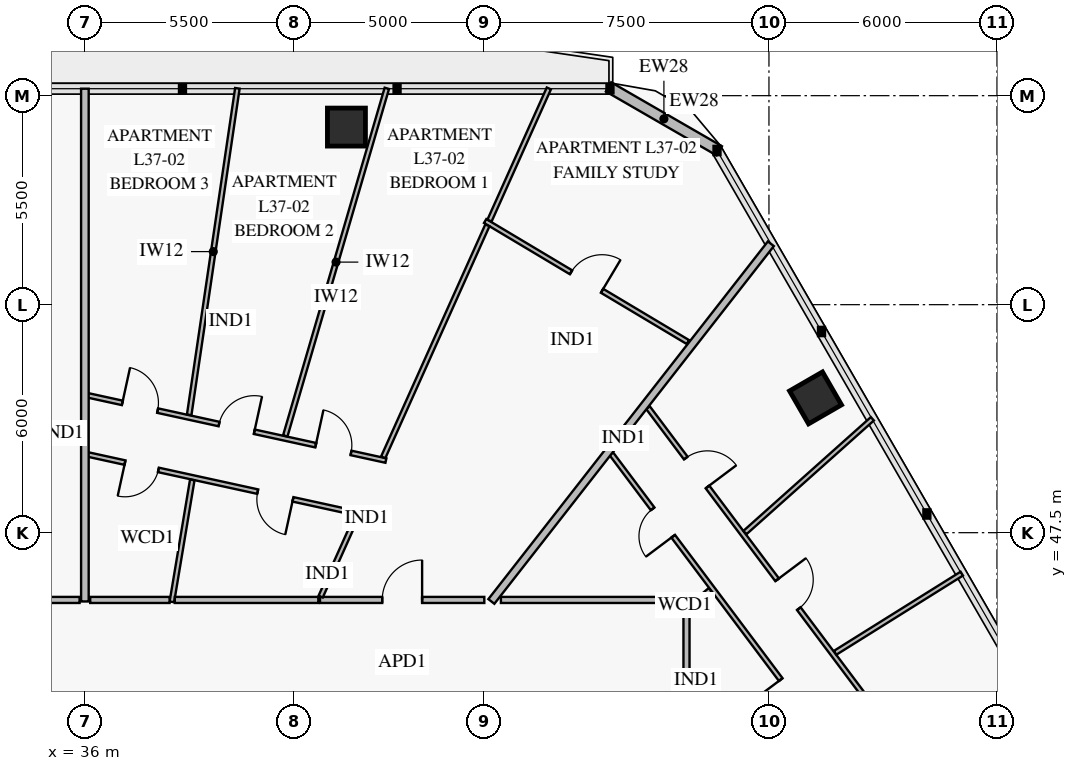
"""IFC4 building model, lengths in metres.
Left out: names, types, materials, properties, quantities, classifications, styles, units other than length and angle.
Written with IfcOpenShell. Run it as: python <this file> out.ifc"""

import sys

from ifc_helpers import new_model, si_unit, direction, frame, frame_2d, origin, origin_2d, place, context, subcontext, project, spatial, rectangle, extrude, element, fill, save


model = new_model("IFC4")
c1 = context("Model", 3, precision=1e-05, world=origin(), true_north=direction((0.0, 1.0)))
c2 = subcontext(c1, "Body", "Model", "MODEL_VIEW")
j1 = project(units=[si_unit("LENGTHUNIT", "METRE"), si_unit("PLANEANGLEUNIT", "RADIAN")], contexts=[c1])
p1 = place(None, origin())
s1 = spatial("IfcSite", under=j1, at=p1, CompositionType="ELEMENT")
p2 = place(p1, origin())
s2 = spatial("IfcBuilding", under=s1, at=p2, CompositionType="ELEMENT")
p3 = place(p2, frame((0.0, 0.0, 150.4)))
s3 = spatial("IfcBuildingStorey", under=s2, at=p3, CompositionType="ELEMENT", Elevation=150.4)
for number, where, z_axis, x_axis in (
    (1, (55.226, 51.047, 0.0), (0.0, 0.0, 1.0), (-0.5, 0.866, 0.0)),
    (2, (42.882, 58.173, 0.0), (0.0, 0.0, 1.0), (-1.0, 0.0, 0.0)),
):
    element("IfcColumn", number, at=place(p3, frame(where, z_axis=z_axis, x_axis=x_axis)), inside=s3, PredefinedType="COLUMN", context=c2, shape_type="SweptSolid", body=[
        extrude(rectangle(XDim=1.0, YDim=1.0, at=origin_2d()), origin(), (0.0, 0.0, 1.0), 3.55),
    ])
p4 = place(p3, frame((49.779, 59.231, 0.0), z_axis=(0.0, 0.0, 1.0), x_axis=(0.866020068361, -0.500009241111, 0.0)))
e3 = element("IfcWall", 3, at=p4, inside=s3, PredefinedType="SOLIDWALL", context=c2, shape_type="SweptSolid", body=[
    extrude(rectangle(XDim=3.365, YDim=0.28, at=frame_2d((1.683, 0.0))), origin(), (0.0, 0.0, 1.0), 3.55),
])
p5 = place(p3, frame((56.748, 40.385, 0.0), z_axis=(0.0, 0.0, 1.0), x_axis=(-0.600156370002, 0.799882698616, 0.0)))
e4 = element("IfcWall", 4, at=p5, inside=s3, PredefinedType="PARTITIONING", context=c2, shape_type="SweptSolid", body=[
    extrude(rectangle(XDim=11.49, YDim=0.12, at=frame_2d((5.745, 0.0))), origin(), (0.0, 0.0, 1.0), 2.9),
])
p6 = place(p5, frame((3.112, 0.0, 0.0)))
e5 = element("IfcOpeningElement", 5, at=p6, cuts=e4, PredefinedType="OPENING", context=c2, shape_type="SweptSolid", body=[
    extrude(rectangle(XDim=0.95, YDim=2.1, at=frame_2d((0.475, 1.05))), frame((0.0, 0.072, 0.0), z_axis=(0.0, -1.0, 0.0), x_axis=(1.0, 0.0, 0.0)), (0.0, 0.0, 1.0), 0.144),
])
p7 = place(p5, frame((8.779, 0.0, 0.0)))
e6 = element("IfcOpeningElement", 6, at=p7, cuts=e4, PredefinedType="OPENING", context=c2, shape_type="SweptSolid", body=[
    extrude(rectangle(XDim=0.9, YDim=2.1, at=frame_2d((0.45, 1.05))), frame((0.0, 0.072, 0.0), z_axis=(0.0, -1.0, 0.0), x_axis=(1.0, 0.0, 0.0)), (0.0, 0.0, 1.0), 0.144),
])
p8 = place(p3, frame((58.183, 40.972, 0.0), z_axis=(0.0, 0.0, 1.0), x_axis=(-0.600136851624, 0.79989734299, 0.0)))
e7 = element("IfcWall", 7, at=p8, inside=s3, PredefinedType="PARTITIONING", context=c2, shape_type="SweptSolid", body=[
    extrude(rectangle(XDim=12.273, YDim=0.12, at=frame_2d((6.136, 0.0))), origin(), (0.0, 0.0, 1.0), 2.9),
])
p9 = place(p8, frame((1.657, 0.0, 0.0)))
e8 = element("IfcOpeningElement", 8, at=p9, cuts=e7, PredefinedType="OPENING", context=c2, shape_type="SweptSolid", body=[
    extrude(rectangle(XDim=0.95, YDim=2.1, at=frame_2d((0.475, 1.05))), frame((0.0, 0.072, 0.0), z_axis=(0.0, -1.0, 0.0), x_axis=(1.0, 0.0, 0.0)), (0.0, 0.0, 1.0), 0.144),
])
p10 = place(p8, frame((5.662, 0.0, 0.0)))
e9 = element("IfcOpeningElement", 9, at=p10, cuts=e7, PredefinedType="OPENING", context=c2, shape_type="SweptSolid", body=[
    extrude(rectangle(XDim=0.95, YDim=2.1, at=frame_2d((0.475, 1.05))), frame((0.0, 0.072, 0.0), z_axis=(0.0, -1.0, 0.0), x_axis=(1.0, 0.0, 0.0)), (0.0, 0.0, 1.0), 0.144),
])
p11 = place(p8, frame((9.666, 0.0, 0.0)))
e10 = element("IfcOpeningElement", 10, at=p11, cuts=e7, PredefinedType="OPENING", context=c2, shape_type="SweptSolid", body=[
    extrude(rectangle(XDim=0.95, YDim=2.1, at=frame_2d((0.475, 1.05))), frame((0.0, 0.072, 0.0), z_axis=(0.0, -1.0, 0.0), x_axis=(1.0, 0.0, 0.0)), (0.0, 0.0, 1.0), 0.144),
])
p12 = place(p3, frame((51.868, 52.516, 0.0), z_axis=(0.0, 0.0, 1.0), x_axis=(-0.85861051464, 0.512628505012, 0.0)))
e11 = element("IfcWall", 11, at=p12, inside=s3, PredefinedType="PARTITIONING", context=c2, shape_type="SweptSolid", body=[
    extrude(rectangle(XDim=6.215, YDim=0.12, at=frame_2d((3.107, 0.0))), origin(), (0.0, 0.0, 1.0), 3.55),
])
p13 = place(p12, frame((2.632, 0.0, 0.0)))
e12 = element("IfcOpeningElement", 12, at=p13, cuts=e11, PredefinedType="OPENING", context=c2, shape_type="SweptSolid", body=[
    extrude(rectangle(XDim=0.95, YDim=2.1, at=frame_2d((0.475, 1.05))), frame((0.0, 0.072, 0.0), z_axis=(0.0, -1.0, 0.0), x_axis=(1.0, 0.0, 0.0)), (0.0, 0.0, 1.0), 0.144),
])
p14 = place(p3, frame((43.285, 47.981, 0.0), z_axis=(0.0, 0.0, 1.0), x_axis=(-0.976898726502, 0.213702779952, 0.0)))
e13 = element("IfcWall", 13, at=p14, inside=s3, PredefinedType="PARTITIONING", context=c2, shape_type="SweptSolid", body=[
    extrude(rectangle(XDim=7.403, YDim=0.12, at=frame_2d((3.701, 0.0))), origin(), (0.0, 0.0, 1.0), 2.9),
])
p15 = place(p14, frame((1.853, 0.0, 0.0)))
e14 = element("IfcOpeningElement", 14, at=p15, cuts=e13, PredefinedType="OPENING", context=c2, shape_type="SweptSolid", body=[
    extrude(rectangle(XDim=0.95, YDim=2.1, at=frame_2d((0.475, 1.05))), frame((0.0, 0.072, 0.0), z_axis=(0.0, -1.0, 0.0), x_axis=(1.0, 0.0, 0.0)), (0.0, 0.0, 1.0), 0.144),
])
p16 = place(p14, frame((5.477, 0.0, 0.0)))
e15 = element("IfcOpeningElement", 15, at=p16, cuts=e13, PredefinedType="OPENING", context=c2, shape_type="SweptSolid", body=[
    extrude(rectangle(XDim=0.9, YDim=2.1, at=frame_2d((0.45, 1.05))), frame((0.0, 0.072, 0.0), z_axis=(0.0, -1.0, 0.0), x_axis=(1.0, 0.0, 0.0)), (0.0, 0.0, 1.0), 0.144),
])
p17 = place(p3, frame((43.921, 49.398, 0.0), z_axis=(0.0, 0.0, 1.0), x_axis=(-0.976896253364, 0.213714085082, 0.0)))
e16 = element("IfcWall", 16, at=p17, inside=s3, PredefinedType="PARTITIONING", context=c2, shape_type="SweptSolid", body=[
    extrude(rectangle(XDim=8.04, YDim=0.12, at=frame_2d((4.02, 0.0))), origin(), (0.0, 0.0, 1.0), 2.9),
])
p18 = place(p17, frame((0.94, 0.0, 0.0)))
e17 = element("IfcOpeningElement", 17, at=p18, cuts=e16, PredefinedType="OPENING", context=c2, shape_type="SweptSolid", body=[
    extrude(rectangle(XDim=0.95, YDim=2.1, at=frame_2d((0.475, 1.05))), frame((0.0, 0.072, 0.0), z_axis=(0.0, -1.0, 0.0), x_axis=(1.0, 0.0, 0.0)), (0.0, 0.0, 1.0), 0.144),
])
p19 = place(p17, frame((3.545, 0.0, 0.0)))
e18 = element("IfcOpeningElement", 18, at=p19, cuts=e16, PredefinedType="OPENING", context=c2, shape_type="SweptSolid", body=[
    extrude(rectangle(XDim=0.95, YDim=2.1, at=frame_2d((0.475, 1.05))), frame((0.0, 0.072, 0.0), z_axis=(0.0, -1.0, 0.0), x_axis=(1.0, 0.0, 0.0)), (0.0, 0.0, 1.0), 0.144),
])
p20 = place(p17, frame((6.15, 0.0, 0.0)))
e19 = element("IfcOpeningElement", 19, at=p20, cuts=e16, PredefinedType="OPENING", context=c2, shape_type="SweptSolid", body=[
    extrude(rectangle(XDim=0.95, YDim=2.1, at=frame_2d((0.475, 1.05))), frame((0.0, 0.072, 0.0), z_axis=(0.0, -1.0, 0.0), x_axis=(1.0, 0.0, 0.0)), (0.0, 0.0, 1.0), 0.144),
])
p21 = place(p3, frame((46.51, 45.73, 0.0), z_axis=(0.0, 0.0, 1.0), x_axis=(-1.0, 0.0, 0.0)))
e20 = element("IfcWall", 20, at=p21, inside=s3, PredefinedType="PARTITIONING", context=c2, shape_type="SweptSolid", body=[
    extrude(rectangle(XDim=4.323, YDim=0.16, at=frame_2d((2.162, 0.0))), origin(), (0.0, 0.0, 1.0), 3.55),
])
p22 = place(p21, frame((1.637, 0.0, 0.0)))
e21 = element("IfcOpeningElement", 21, at=p22, cuts=e20, PredefinedType="OPENING", context=c2, shape_type="SweptSolid", body=[
    extrude(rectangle(XDim=1.05, YDim=2.15, at=frame_2d((0.525, 1.075))), frame((0.0, 0.092, 0.0), z_axis=(0.0, -1.0, 0.0), x_axis=(1.0, 0.0, 0.0)), (0.0, 0.0, 1.0), 0.184),
])
p23 = place(p3, frame((35.86, 45.73, 0.0), z_axis=(0.0, 0.0, 1.0), x_axis=(-1.0, 0.0, 0.0)))
e22 = element("IfcWall", 22, at=p23, inside=s3, PredefinedType="PARTITIONING", context=c2, shape_type="SweptSolid", body=[
    extrude(rectangle(XDim=3.797, YDim=0.16, at=frame_2d((1.898, 0.0))), origin(), (0.0, 0.0, 1.0), 2.9),
])
p24 = place(p23, frame((1.374, 0.0, 0.0)))
e23 = element("IfcOpeningElement", 23, at=p24, cuts=e22, PredefinedType="OPENING", context=c2, shape_type="SweptSolid", body=[
    extrude(rectangle(XDim=1.05, YDim=2.15, at=frame_2d((0.525, 1.075))), frame((0.0, 0.092, 0.0), z_axis=(0.0, -1.0, 0.0), x_axis=(1.0, 0.0, 0.0)), (0.0, 0.0, 1.0), 0.184),
])
p25 = place(p3, frame((51.78, 45.425, 0.0), z_axis=(0.0, 0.0, 1.0), x_axis=(0.761652645913, 0.647985529911, 0.0)))
e24 = element("IfcWall", 24, at=p25, inside=s3, PredefinedType="PARTITIONING", context=c2, shape_type="SweptSolid", body=[
    extrude(rectangle(XDim=0.883, YDim=0.12, at=frame_2d((0.441, 0.0))), origin(), (0.0, 0.0, 1.0), 3.55),
])
p26 = place(p3, frame((55.741, 44.339, 0.0), z_axis=(0.0, 0.0, 1.0), x_axis=(0.847998304005, 0.529998940003, 0.0)))
e25 = element("IfcWall", 25, at=p26, inside=s3, PredefinedType="PARTITIONING", context=c2, shape_type="SweptSolid", body=[
    extrude(rectangle(XDim=3.929, YDim=0.12, at=frame_2d((1.965, 0.0))), origin(), (0.0, 0.0, 1.0), 2.87),
])
p27 = place(p3, frame((53.368, 47.503, 0.0), z_axis=(0.0, 0.0, 1.0), x_axis=(0.746002225815, 0.665943450361, 0.0)))
e26 = element("IfcWall", 26, at=p27, inside=s3, PredefinedType="PARTITIONING", context=c2, shape_type="SweptSolid", body=[
    extrude(rectangle(XDim=4.495, YDim=0.12, at=frame_2d((2.248, 0.0))), origin(), (0.0, 0.0, 1.0), 2.87),
])
p28 = place(p3, frame((46.696, 45.69, 0.0), z_axis=(0.0, 0.0, 1.0), x_axis=(0.615655544117, 0.788015387539, 0.0)))
e27 = element("IfcWall", 27, at=p28, inside=s3, PredefinedType="PARTITIONING", context=c2, shape_type="SweptSolid", body=[
    extrude(rectangle(XDim=11.945, YDim=0.2, at=frame_2d((5.973, 0.0))), origin(), (0.0, 0.0, 1.0), 2.87),
])
p29 = place(p3, frame((38.289, 45.68, 0.0), z_axis=(0.0, 0.0, 1.0), x_axis=(0.165019864142, 0.986290243508, 0.0)))
e28 = element("IfcWall", 28, at=p29, inside=s3, PredefinedType="PARTITIONING", context=c2, shape_type="SweptSolid", body=[
    extrude(rectangle(XDim=3.252, YDim=0.12, at=frame_2d((1.626, 0.0))), origin(), (0.0, 0.0, 1.0), 3.55),
])
p30 = place(p3, frame((41.273, 50.047, 0.0), z_axis=(0.0, 0.0, 1.0), x_axis=(0.280455502413, 0.959867027856, 0.0)))
e29 = element("IfcWall", 29, at=p30, inside=s3, PredefinedType="PARTITIONING", context=c2, shape_type="SweptSolid", body=[
    extrude(rectangle(XDim=9.529, YDim=0.12, at=frame_2d((4.764, 0.0))), origin(), (0.0, 0.0, 1.0), 2.87),
])
p31 = place(p3, frame((38.744, 50.6, 0.0), z_axis=(0.0, 0.0, 1.0), x_axis=(0.145960873314, 0.989290363574, 0.0)))
e30 = element("IfcWall", 30, at=p31, inside=s3, PredefinedType="PARTITIONING", context=c2, shape_type="SweptSolid", body=[
    extrude(rectangle(XDim=8.686, YDim=0.12, at=frame_2d((4.343, 0.0))), origin(), (0.0, 0.0, 1.0), 2.87),
])
p32 = place(p3, frame((42.204, 45.818, 0.0), z_axis=(0.0, 0.0, 1.0), x_axis=(0.409661727666, 0.91223750684, 0.0)))
e31 = element("IfcWall", 31, at=p32, inside=s3, PredefinedType="PARTITIONING", context=c2, shape_type="SweptSolid", body=[
    extrude(rectangle(XDim=2.325, YDim=0.12, at=frame_2d((1.163, 0.0))), origin(), (0.0, 0.0, 1.0), 3.55),
])
p33 = place(p3, frame((43.85, 49.483, 0.0), z_axis=(0.0, 0.0, 1.0), x_axis=(0.409625724798, 0.912253673922, 0.0)))
e32 = element("IfcWall", 32, at=p33, inside=s3, PredefinedType="PARTITIONING", context=c2, shape_type="SweptSolid", body=[
    extrude(rectangle(XDim=6.691, YDim=0.12, at=frame_2d((3.346, 0.0))), origin(), (0.0, 0.0, 1.0), 3.55),
])
p34 = place(p3, frame((46.647, 55.712, 0.0), z_axis=(0.0, 0.0, 1.0), x_axis=(0.409634994126, 0.912249511695, 0.0)))
e33 = element("IfcWall", 33, at=p34, inside=s3, PredefinedType="PARTITIONING", context=c2, shape_type="SweptSolid", body=[
    extrude(rectangle(XDim=3.812, YDim=0.12, at=frame_2d((1.906, 0.0))), origin(), (0.0, 0.0, 1.0), 2.87),
])
p35 = place(p3, frame((36.0, 45.69, 0.0), z_axis=(0.0, 0.0, 1.0), x_axis=(0.0, 1.0, 0.0)))
e34 = element("IfcWall", 34, at=p35, inside=s3, PredefinedType="PARTITIONING", context=c2, shape_type="SweptSolid", body=[
    extrude(rectangle(XDim=13.493, YDim=0.2, at=frame_2d((6.747, 0.0))), origin(), (0.0, 0.0, 1.0), 2.87),
])
p36 = place(p3, frame((51.83, 41.85, 0.0), z_axis=(0.0, 0.0, 1.0), x_axis=(0.0, 1.0, 0.0)))
e35 = element("IfcWall", 35, at=p36, inside=s3, PredefinedType="PARTITIONING", context=c2, shape_type="SweptSolid", body=[
    extrude(rectangle(XDim=3.528, YDim=0.16, at=frame_2d((1.764, 0.0))), origin(), (0.0, 0.0, 1.0), 3.15),
])
p37 = place(p3, frame((51.65, 45.73, 0.0), z_axis=(0.0, 0.0, 1.0), x_axis=(-1.0, 0.0, 0.0)))
e36 = element("IfcWall", 36, at=p37, inside=s3, PredefinedType="PARTITIONING", context=c2, shape_type="SweptSolid", body=[
    extrude(rectangle(XDim=4.703, YDim=0.16, at=frame_2d((2.352, 0.0))), origin(), (0.0, 0.0, 1.0), 2.9),
])
p38 = place(p3, frame((42.143, 45.73, 0.0), z_axis=(0.0, 0.0, 1.0), x_axis=(-1.0, 0.0, 0.0)))
e37 = element("IfcWall", 37, at=p38, inside=s3, PredefinedType="PARTITIONING", context=c2, shape_type="SweptSolid", body=[
    extrude(rectangle(XDim=3.777, YDim=0.16, at=frame_2d((1.888, 0.0))), origin(), (0.0, 0.0, 1.0), 2.9),
])
p39 = place(p3, frame((38.228, 45.73, 0.0), z_axis=(0.0, 0.0, 1.0), x_axis=(-1.0, 0.0, 0.0)))
e38 = element("IfcWall", 38, at=p39, inside=s3, PredefinedType="PARTITIONING", context=c2, shape_type="SweptSolid", body=[
    extrude(rectangle(XDim=2.088, YDim=0.16, at=frame_2d((1.044, 0.0))), origin(), (0.0, 0.0, 1.0), 3.55),
])
p40 = place(p6, origin())
e39 = element("IfcDoor", 39, at=p40, inside=s3, OperationType="SINGLE_SWING_RIGHT", PredefinedType="DOOR", context=c2, shape_type="SweptSolid", body=[
    extrude(rectangle(XDim=0.95, YDim=2.1, at=frame_2d((0.475, 1.05))), frame((0.0, 0.025, 0.0), z_axis=(0.0, -1.0, 0.0), x_axis=(1.0, 0.0, 0.0)), (0.0, 0.0, 1.0), 0.05),
])
fill(e5, e39)
p41 = place(p7, origin())
e40 = element("IfcDoor", 40, at=p41, inside=s3, OperationType="SINGLE_SWING_LEFT", PredefinedType="DOOR", context=c2, shape_type="SweptSolid", body=[
    extrude(rectangle(XDim=0.9, YDim=2.1, at=frame_2d((0.45, 1.05))), frame((0.0, 0.025, 0.0), z_axis=(0.0, -1.0, 0.0), x_axis=(1.0, 0.0, 0.0)), (0.0, 0.0, 1.0), 0.05),
])
fill(e6, e40)
p42 = place(p10, frame((0.95, 0.0, 0.0), z_axis=(0.0, 0.0, 1.0), x_axis=(-1.0, 0.0, 0.0)))
e41 = element("IfcDoor", 41, at=p42, inside=s3, OperationType="SINGLE_SWING_LEFT", PredefinedType="DOOR", context=c2, shape_type="SweptSolid", body=[
    extrude(rectangle(XDim=0.95, YDim=2.1, at=frame_2d((0.475, 1.05))), frame((0.0, 0.025, 0.0), z_axis=(0.0, -1.0, 0.0), x_axis=(1.0, 0.0, 0.0)), (0.0, 0.0, 1.0), 0.05),
])
fill(e9, e41)
p43 = place(p11, frame((0.95, 0.0, 0.0), z_axis=(0.0, 0.0, 1.0), x_axis=(-1.0, 0.0, 0.0)))
e42 = element("IfcDoor", 42, at=p43, inside=s3, OperationType="SINGLE_SWING_RIGHT", PredefinedType="DOOR", context=c2, shape_type="SweptSolid", body=[
    extrude(rectangle(XDim=0.95, YDim=2.1, at=frame_2d((0.475, 1.05))), frame((0.0, 0.025, 0.0), z_axis=(0.0, -1.0, 0.0), x_axis=(1.0, 0.0, 0.0)), (0.0, 0.0, 1.0), 0.05),
])
fill(e10, e42)
p44 = place(p13, frame((0.95, 0.0, 0.0), z_axis=(0.0, 0.0, 1.0), x_axis=(-1.0, 0.0, 0.0)))
e43 = element("IfcDoor", 43, at=p44, inside=s3, OperationType="SINGLE_SWING_RIGHT", PredefinedType="DOOR", context=c2, shape_type="SweptSolid", body=[
    extrude(rectangle(XDim=0.95, YDim=2.1, at=frame_2d((0.475, 1.05))), frame((0.0, 0.025, 0.0), z_axis=(0.0, -1.0, 0.0), x_axis=(1.0, 0.0, 0.0)), (0.0, 0.0, 1.0), 0.05),
])
fill(e12, e43)
p45 = place(p15, origin())
e44 = element("IfcDoor", 44, at=p45, inside=s3, OperationType="SINGLE_SWING_LEFT", PredefinedType="DOOR", context=c2, shape_type="SweptSolid", body=[
    extrude(rectangle(XDim=0.95, YDim=2.1, at=frame_2d((0.475, 1.05))), frame((0.0, 0.025, 0.0), z_axis=(0.0, -1.0, 0.0), x_axis=(1.0, 0.0, 0.0)), (0.0, 0.0, 1.0), 0.05),
])
fill(e14, e44)
p46 = place(p16, origin())
e45 = element("IfcDoor", 45, at=p46, inside=s3, OperationType="SINGLE_SWING_RIGHT", PredefinedType="DOOR", context=c2, shape_type="SweptSolid", body=[
    extrude(rectangle(XDim=0.9, YDim=2.1, at=frame_2d((0.45, 1.05))), frame((0.0, 0.025, 0.0), z_axis=(0.0, -1.0, 0.0), x_axis=(1.0, 0.0, 0.0)), (0.0, 0.0, 1.0), 0.05),
])
fill(e15, e45)
p47 = place(p18, frame((0.95, 0.0, 0.0), z_axis=(0.0, 0.0, 1.0), x_axis=(-1.0, 0.0, 0.0)))
e46 = element("IfcDoor", 46, at=p47, inside=s3, OperationType="SINGLE_SWING_LEFT", PredefinedType="DOOR", context=c2, shape_type="SweptSolid", body=[
    extrude(rectangle(XDim=0.95, YDim=2.1, at=frame_2d((0.475, 1.05))), frame((0.0, 0.025, 0.0), z_axis=(0.0, -1.0, 0.0), x_axis=(1.0, 0.0, 0.0)), (0.0, 0.0, 1.0), 0.05),
])
fill(e17, e46)
p48 = place(p19, frame((0.95, 0.0, 0.0), z_axis=(0.0, 0.0, 1.0), x_axis=(-1.0, 0.0, 0.0)))
e47 = element("IfcDoor", 47, at=p48, inside=s3, OperationType="SINGLE_SWING_RIGHT", PredefinedType="DOOR", context=c2, shape_type="SweptSolid", body=[
    extrude(rectangle(XDim=0.95, YDim=2.1, at=frame_2d((0.475, 1.05))), frame((0.0, 0.025, 0.0), z_axis=(0.0, -1.0, 0.0), x_axis=(1.0, 0.0, 0.0)), (0.0, 0.0, 1.0), 0.05),
])
fill(e18, e47)
p49 = place(p20, frame((0.95, 0.0, 0.0), z_axis=(0.0, 0.0, 1.0), x_axis=(-1.0, 0.0, 0.0)))
e48 = element("IfcDoor", 48, at=p49, inside=s3, OperationType="SINGLE_SWING_LEFT", PredefinedType="DOOR", context=c2, shape_type="SweptSolid", body=[
    extrude(rectangle(XDim=0.95, YDim=2.1, at=frame_2d((0.475, 1.05))), frame((0.0, 0.025, 0.0), z_axis=(0.0, -1.0, 0.0), x_axis=(1.0, 0.0, 0.0)), (0.0, 0.0, 1.0), 0.05),
])
fill(e19, e48)
p50 = place(p22, frame((1.05, 0.0, 0.0), z_axis=(0.0, 0.0, 1.0), x_axis=(-1.0, 0.0, 0.0)))
e49 = element("IfcDoor", 49, at=p50, inside=s3, OperationType="SINGLE_SWING_RIGHT", PredefinedType="DOOR", context=c2, shape_type="SweptSolid", body=[
    extrude(rectangle(XDim=1.05, YDim=2.15, at=frame_2d((0.525, 1.075))), frame((0.0, 0.025, 0.0), z_axis=(0.0, -1.0, 0.0), x_axis=(1.0, 0.0, 0.0)), (0.0, 0.0, 1.0), 0.05),
])
fill(e21, e49)
save(model, sys.argv[1])
